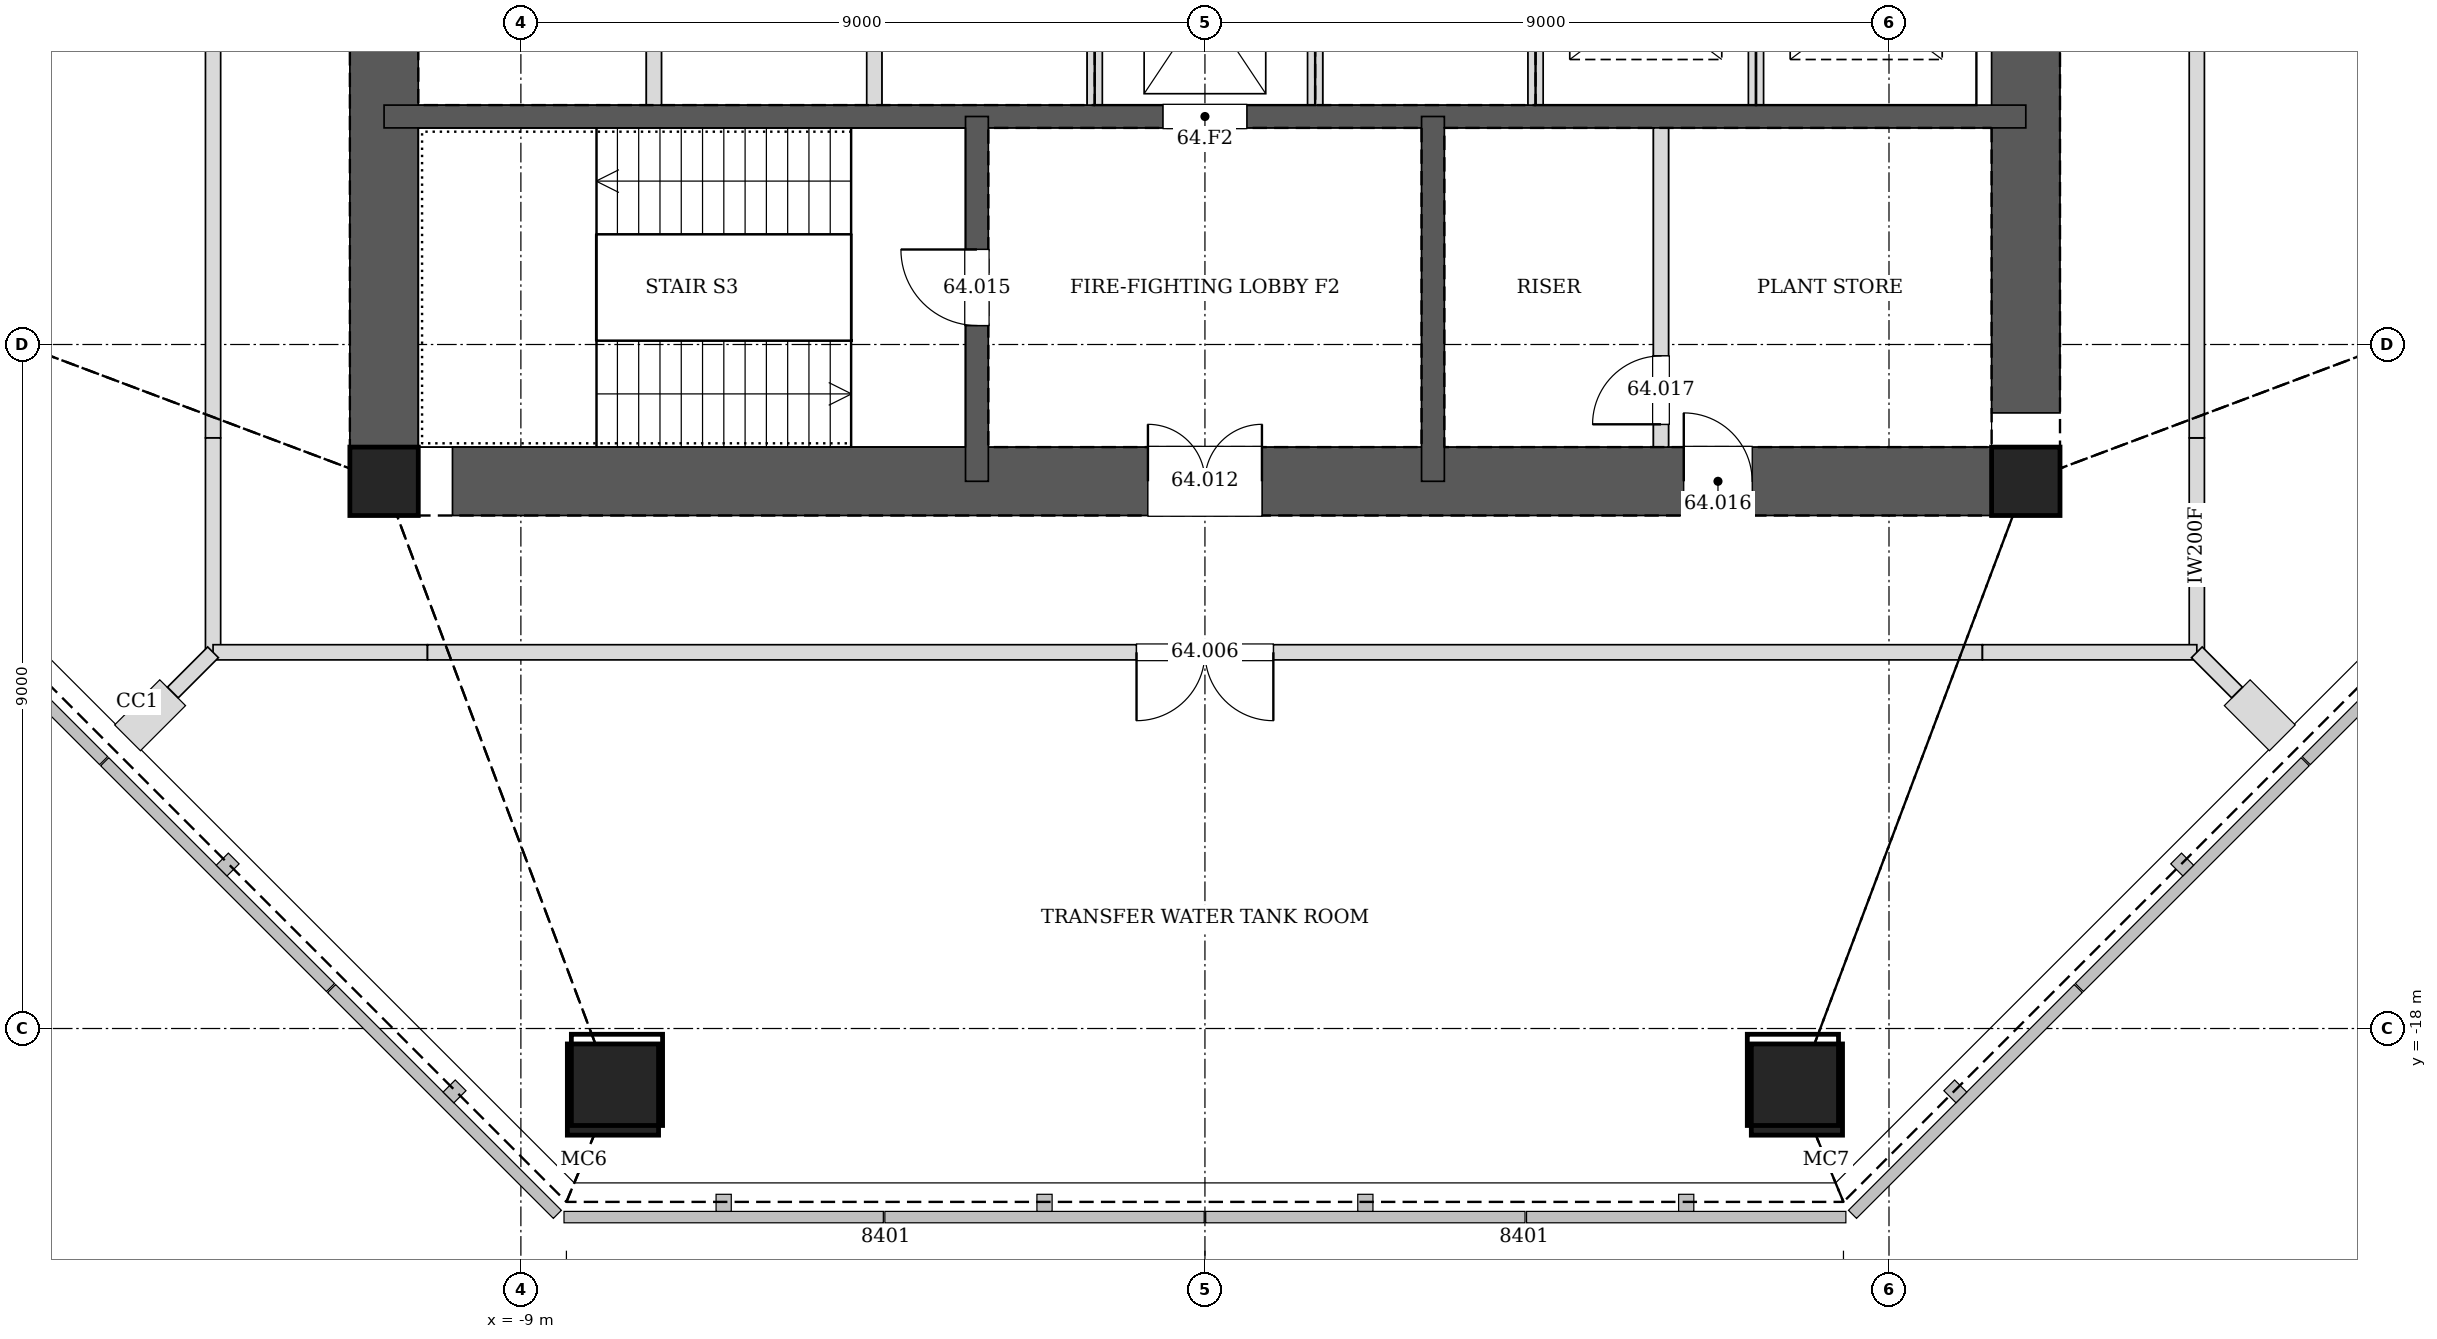
"""IFC4 building model, lengths in metres.
Left out: names, types, materials, properties, quantities, classifications, styles, units other than length and angle.
Written with IfcOpenShell. Run it as: python <this file> out.ifc"""

import sys

from ifc_helpers import new_model, si_unit, direction, frame, frame_2d, origin, origin_2d, place, context, subcontext, project, spatial, rectangle, hollow_rectangle, extrude, element, fill, save


model = new_model("IFC4")
c1 = context("Model", 3, precision=1e-05, world=origin(), true_north=direction((0.0, 1.0)))
c2 = subcontext(c1, "Body", "Model", "MODEL_VIEW")
j1 = project(units=[si_unit("LENGTHUNIT", "METRE"), si_unit("PLANEANGLEUNIT", "RADIAN")], contexts=[c1])
p1 = place(None, origin())
s1 = spatial("IfcSite", under=j1, at=p1, CompositionType="ELEMENT")
p2 = place(p1, origin())
s2 = spatial("IfcBuilding", under=s1, at=p2, CompositionType="ELEMENT")
p3 = place(p2, frame((0.0, 0.0, 266.3)))
s3 = spatial("IfcBuildingStorey", under=s2, at=p3, CompositionType="ELEMENT", Elevation=266.3)
for number, where, z_axis, x_axis in (
    (1, (-7.789, -18.803, 0.0), (0.012, 0.028, 1.0), (-0.924, 0.383, 0.0)),
    (2, (7.789, -18.803, 0.0), (-0.012, 0.028, 1.0), (-0.924, -0.383, 0.0)),
):
    element("IfcColumn", number, at=place(p3, frame(where, z_axis=z_axis, x_axis=x_axis)), inside=s3, PredefinedType="COLUMN", context=c2, shape_type="SweptSolid", body=[
        extrude(hollow_rectangle(XDim=1.2, YDim=1.2, WallThickness=0.055, at=origin_2d()), origin(), (0.0, 0.0, 1.0), 4.502),
    ])
for number, where, z_axis, x_axis in (
    (3, (-10.8, -10.8, 0.0), (0.0, 0.0, 1.0), (1.0, 0.0, 0.0)),
    (4, (10.8, -10.8, 0.0), (0.0, 0.0, 1.0), (1.0, 0.0, 0.0)),
):
    element("IfcColumn", number, at=place(p3, frame(where, z_axis=z_axis, x_axis=x_axis)), inside=s3, PredefinedType="COLUMN", context=c2, shape_type="SweptSolid", body=[
        extrude(hollow_rectangle(XDim=0.9, YDim=0.9, WallThickness=0.04, at=origin_2d()), origin(), (0.0, 0.0, 1.0), 4.5),
    ])
p4 = place(p3, frame((-10.8, -10.8, 0.0), z_axis=(0.0, 0.0, 1.0), x_axis=(1.0, 0.0, 0.0)))
e5 = element("IfcWall", 5, at=p4, inside=s3, PredefinedType="SOLIDWALL", context=c2, shape_type="SweptSolid", body=[
    extrude(rectangle(XDim=21.6, YDim=0.9, at=frame_2d((10.8, 0.0))), origin(), (0.0, 0.0, 1.0), 4.5),
])
p5 = place(p4, frame((10.05, 0.0, 0.0)))
e6 = element("IfcOpeningElement", 6, at=p5, cuts=e5, PredefinedType="OPENING", context=c2, shape_type="SweptSolid", body=[
    extrude(rectangle(XDim=1.5, YDim=2.1, at=frame_2d((0.75, 1.05))), frame((0.0, 0.46, 0.0), z_axis=(0.0, -1.0, 0.0), x_axis=(1.0, 0.0, 0.0)), (0.0, 0.0, 1.0), 0.92),
])
p6 = place(p4, frame((17.1, 0.0, 0.0)))
e7 = element("IfcOpeningElement", 7, at=p6, cuts=e5, PredefinedType="OPENING", context=c2, shape_type="SweptSolid", body=[
    extrude(rectangle(XDim=0.9, YDim=2.1, at=frame_2d((0.45, 1.05))), frame((0.0, 0.46, 0.0), z_axis=(0.0, -1.0, 0.0), x_axis=(1.0, 0.0, 0.0)), (0.0, 0.0, 1.0), 0.92),
])
p7 = place(p3, frame((10.8, -10.8, 0.0), z_axis=(0.0, 0.0, 1.0), x_axis=(0.0, 1.0, 0.0)))
e8 = element("IfcWall", 8, at=p7, inside=s3, PredefinedType="SOLIDWALL", context=c2, shape_type="SweptSolid", body=[
    extrude(rectangle(XDim=21.6, YDim=0.9, at=frame_2d((10.8, 0.0))), origin(), (0.0, 0.0, 1.0), 4.5),
])
p8 = place(p7, frame((11.7, 0.0, 0.0)))
e9 = element("IfcOpeningElement", 9, at=p8, cuts=e8, PredefinedType="OPENING", context=c2, shape_type="SweptSolid", body=[
    extrude(rectangle(XDim=1.2, YDim=2.1, at=frame_2d((0.6, 1.05))), frame((0.0, 0.46, 0.0), z_axis=(0.0, -1.0, 0.0), x_axis=(1.0, 0.0, 0.0)), (0.0, 0.0, 1.0), 0.92),
])
p9 = place(p7, frame((8.7, 0.0, 0.0)))
e10 = element("IfcOpeningElement", 10, at=p9, cuts=e8, PredefinedType="OPENING", context=c2, shape_type="SweptSolid", body=[
    extrude(rectangle(XDim=1.2, YDim=2.1, at=frame_2d((0.6, 1.05))), frame((0.0, 0.46, 0.0), z_axis=(0.0, -1.0, 0.0), x_axis=(1.0, 0.0, 0.0)), (0.0, 0.0, 1.0), 0.92),
])
p10 = place(p3, frame((-10.8, 10.8, 0.0), z_axis=(0.0, 0.0, 1.0), x_axis=(0.0, -1.0, 0.0)))
e11 = element("IfcWall", 11, at=p10, inside=s3, PredefinedType="SOLIDWALL", context=c2, shape_type="SweptSolid", body=[
    extrude(rectangle(XDim=21.6, YDim=0.9, at=frame_2d((10.8, 0.0))), origin(), (0.0, 0.0, 1.0), 4.5),
])
p11 = place(p10, frame((8.7, 0.0, 0.0)))
e12 = element("IfcOpeningElement", 12, at=p11, cuts=e11, PredefinedType="OPENING", context=c2, shape_type="SweptSolid", body=[
    extrude(rectangle(XDim=1.2, YDim=2.1, at=frame_2d((0.6, 1.05))), frame((0.0, 0.46, 0.0), z_axis=(0.0, -1.0, 0.0), x_axis=(1.0, 0.0, 0.0)), (0.0, 0.0, 1.0), 0.92),
])
p12 = place(p10, frame((11.7, 0.0, 0.0)))
e13 = element("IfcOpeningElement", 13, at=p12, cuts=e11, PredefinedType="OPENING", context=c2, shape_type="SweptSolid", body=[
    extrude(rectangle(XDim=1.2, YDim=2.1, at=frame_2d((0.6, 1.05))), frame((0.0, 0.46, 0.0), z_axis=(0.0, -1.0, 0.0), x_axis=(1.0, 0.0, 0.0)), (0.0, 0.0, 1.0), 0.92),
])
p13 = place(p3, frame((-10.8, -6.0, 0.0), z_axis=(0.0, 0.0, 1.0), x_axis=(1.0, 0.0, 0.0)))
e14 = element("IfcWall", 14, at=p13, inside=s3, PredefinedType="SOLIDWALL", context=c2, shape_type="SweptSolid", body=[
    extrude(rectangle(XDim=21.6, YDim=0.3, at=frame_2d((10.8, 0.0))), origin(), (0.0, 0.0, 1.0), 4.5),
])
p14 = place(p13, frame((10.25, 0.0, 0.0)))
e15 = element("IfcOpeningElement", 15, at=p14, cuts=e14, PredefinedType="OPENING", context=c2, shape_type="SweptSolid", body=[
    extrude(rectangle(XDim=1.1, YDim=2.1, at=frame_2d((0.55, 1.05))), frame((0.0, 0.16, 0.0), z_axis=(0.0, -1.0, 0.0), x_axis=(1.0, 0.0, 0.0)), (0.0, 0.0, 1.0), 0.32),
])
p15 = place(p3, frame((-3.0, -6.0, 0.0), z_axis=(0.0, 0.0, 1.0), x_axis=(0.0, -1.0, 0.0)))
e16 = element("IfcWall", 16, at=p15, inside=s3, PredefinedType="SOLIDWALL", context=c2, shape_type="SweptSolid", body=[
    extrude(rectangle(XDim=4.8, YDim=0.3, at=frame_2d((2.4, 0.0))), origin(), (0.0, 0.0, 1.0), 4.5),
])
p16 = place(p15, frame((1.75, 0.0, 0.0)))
e17 = element("IfcOpeningElement", 17, at=p16, cuts=e16, PredefinedType="OPENING", context=c2, shape_type="SweptSolid", body=[
    extrude(rectangle(XDim=1.0, YDim=2.1, at=frame_2d((0.5, 1.05))), frame((0.0, 0.16, 0.0), z_axis=(0.0, -1.0, 0.0), x_axis=(1.0, 0.0, 0.0)), (0.0, 0.0, 1.0), 0.32),
])
p17 = place(p3, frame((3.0, -6.0, 0.0), z_axis=(0.0, 0.0, 1.0), x_axis=(0.0, -1.0, 0.0)))
e18 = element("IfcWall", 18, at=p17, inside=s3, PredefinedType="SOLIDWALL", context=c2, shape_type="SweptSolid", body=[
    extrude(rectangle(XDim=4.8, YDim=0.3, at=frame_2d((2.4, 0.0))), origin(), (0.0, 0.0, 1.0), 4.5),
])
p18 = place(p3, frame((13.05, -13.05, 0.0), z_axis=(0.0, 0.0, 1.0), x_axis=(0.0, 1.0, 0.0)))
e19 = element("IfcWall", 19, at=p18, inside=s3, PredefinedType="PARTITIONING", context=c2, shape_type="SweptSolid", body=[
    extrude(rectangle(XDim=2.82, YDim=0.2, at=frame_2d((1.41, 0.0))), origin(), (0.0, 0.0, 1.0), 3.678),
])
p19 = place(p3, frame((13.05, -10.228, 0.0), z_axis=(0.0, 0.0, 1.0), x_axis=(0.0, 1.0, 0.0)))
e20 = element("IfcWall", 20, at=p19, inside=s3, PredefinedType="PARTITIONING", context=c2, shape_type="SweptSolid", body=[
    extrude(rectangle(XDim=12.829, YDim=0.2, at=frame_2d((6.415, 0.0))), origin(), (0.0, 0.0, 1.0), 3.363),
])
p20 = place(p19, frame((5.786, 0.0, 0.0)))
e21 = element("IfcOpeningElement", 21, at=p20, cuts=e20, PredefinedType="OPENING", context=c2, shape_type="SweptSolid", body=[
    extrude(rectangle(XDim=1.8, YDim=2.4, at=frame_2d((0.9, 1.2))), frame((0.0, 0.11, 0.0), z_axis=(0.0, -1.0, 0.0), x_axis=(1.0, 0.0, 0.0)), (0.0, 0.0, 1.0), 0.22),
])
p21 = place(p3, frame((-13.05, 10.228, 0.0), z_axis=(0.0, 0.0, 1.0), x_axis=(0.0, -1.0, 0.0)))
e22 = element("IfcWall", 22, at=p21, inside=s3, PredefinedType="PARTITIONING", context=c2, shape_type="SweptSolid", body=[
    extrude(rectangle(XDim=20.456, YDim=0.2, at=frame_2d((10.228, 0.0))), origin(), (0.0, 0.0, 1.0), 3.363),
])
p22 = place(p21, frame((9.328, 0.0, 0.0)))
e23 = element("IfcOpeningElement", 23, at=p22, cuts=e22, PredefinedType="OPENING", context=c2, shape_type="SweptSolid", body=[
    extrude(rectangle(XDim=1.8, YDim=2.4, at=frame_2d((0.9, 1.2))), frame((0.0, 0.11, 0.0), z_axis=(0.0, -1.0, 0.0), x_axis=(1.0, 0.0, 0.0)), (0.0, 0.0, 1.0), 0.22),
])
for number, where, z_axis, x_axis in (
    (24, (-13.05, -10.23, 0.0), (0.0, 0.0, 1.0), (0.0, -1.0, 0.0)),
    (25, (-13.05, -13.05, 0.0), (0.0, 0.0, 1.0), (1.0, 0.0, 0.0)),
):
    element("IfcWall", number, at=place(p3, frame(where, z_axis=z_axis, x_axis=x_axis)), inside=s3, PredefinedType="PARTITIONING", context=c2, shape_type="SweptSolid", body=[
        extrude(rectangle(XDim=2.82, YDim=0.2, at=frame_2d((1.41, 0.0))), origin(), (0.0, 0.0, 1.0), 3.678),
    ])
p23 = place(p3, frame((-10.228, -13.05, 0.0), z_axis=(0.0, 0.0, 1.0), x_axis=(1.0, 0.0, 0.0)))
e26 = element("IfcWall", 26, at=p23, inside=s3, PredefinedType="PARTITIONING", context=c2, shape_type="SweptSolid", body=[
    extrude(rectangle(XDim=20.456, YDim=0.2, at=frame_2d((10.228, 0.0))), origin(), (0.0, 0.0, 1.0), 3.363),
])
p24 = place(p23, frame((9.328, 0.0, 0.0)))
e27 = element("IfcOpeningElement", 27, at=p24, cuts=e26, PredefinedType="OPENING", context=c2, shape_type="SweptSolid", body=[
    extrude(rectangle(XDim=1.8, YDim=2.4, at=frame_2d((0.9, 1.2))), frame((0.0, 0.11, 0.0), z_axis=(0.0, -1.0, 0.0), x_axis=(1.0, 0.0, 0.0)), (0.0, 0.0, 1.0), 0.22),
])
p25 = place(p3, frame((10.23, -13.05, 0.0), z_axis=(0.0, 0.0, 1.0), x_axis=(1.0, 0.0, 0.0)))
e28 = element("IfcWall", 28, at=p25, inside=s3, PredefinedType="PARTITIONING", context=c2, shape_type="SweptSolid", body=[
    extrude(rectangle(XDim=2.82, YDim=0.2, at=frame_2d((1.41, 0.0))), origin(), (0.0, 0.0, 1.0), 3.678),
])
for number, where, z_axis, x_axis in (
    (29, (13.05, -13.05, 0.0), (0.0, 0.0, 1.0), (0.707, -0.707, 0.0)),
    (30, (-13.579, -13.579, 0.0), (0.0, 0.0, 1.0), (0.707, 0.707, 0.0)),
):
    element("IfcWall", number, at=place(p3, frame(where, z_axis=z_axis, x_axis=x_axis)), inside=s3, PredefinedType="PARTITIONING", context=c2, shape_type="SweptSolid", body=[
        extrude(rectangle(XDim=0.748, YDim=0.2, at=frame_2d((0.374, 0.0))), origin(), (0.0, 0.0, 1.0), 3.678),
    ])
for number, where, z_axis, x_axis in (
    (31, (-7.25, -5.85, 0.0), (0.0, 0.0, 1.0), (0.0, 1.0, 0.0)),
    (32, (-4.35, -5.85, 0.0), (0.0, 0.0, 1.0), (0.0, 1.0, 0.0)),
    (33, (-1.45, -5.85, 0.0), (0.0, 0.0, 1.0), (0.0, 1.0, 0.0)),
    (34, (1.45, -5.85, 0.0), (0.0, 0.0, 1.0), (0.0, 1.0, 0.0)),
    (35, (4.35, -5.85, 0.0), (0.0, 0.0, 1.0), (0.0, 1.0, 0.0)),
):
    element("IfcWall", number, at=place(p3, frame(where, z_axis=z_axis, x_axis=x_axis)), inside=s3, PredefinedType="PARTITIONING", context=c2, shape_type="SweptSolid", body=[
        extrude(rectangle(XDim=2.7, YDim=0.2, at=frame_2d((1.35, 0.0))), origin(), (0.0, 0.0, 1.0), 4.3),
    ])
p26 = place(p3, frame((7.25, -5.85, 0.0), z_axis=(0.0, 0.0, 1.0), x_axis=(0.0, 1.0, 0.0)))
e36 = element("IfcWall", 36, at=p26, inside=s3, PredefinedType="PARTITIONING", context=c2, shape_type="SweptSolid", body=[
    extrude(rectangle(XDim=2.7, YDim=0.2, at=frame_2d((1.35, 0.0))), origin(), (0.0, 0.0, 1.0), 4.5),
])
p27 = place(p3, frame((6.0, -10.35, 0.0), z_axis=(0.0, 0.0, 1.0), x_axis=(0.0, 1.0, 0.0)))
e37 = element("IfcWall", 37, at=p27, inside=s3, PredefinedType="PARTITIONING", context=c2, shape_type="SweptSolid", body=[
    extrude(rectangle(XDim=4.2, YDim=0.2, at=frame_2d((2.1, 0.0))), origin(), (0.0, 0.0, 1.0), 4.3),
])
p28 = place(p27, frame((0.3, 0.0, 0.0)))
e38 = element("IfcOpeningElement", 38, at=p28, cuts=e37, PredefinedType="OPENING", context=c2, shape_type="SweptSolid", body=[
    extrude(rectangle(XDim=0.9, YDim=2.1, at=frame_2d((0.45, 1.05))), frame((0.0, 0.11, 0.0), z_axis=(0.0, -1.0, 0.0), x_axis=(1.0, 0.0, 0.0)), (0.0, 0.0, 1.0), 0.22),
])
p29 = place(p24, frame((1.8, 0.0, 0.0), z_axis=(0.0, 0.0, 1.0), x_axis=(-1.0, 0.0, 0.0)))
e39 = element("IfcDoor", 39, at=p29, inside=s3, OperationType="DOUBLE_DOOR_SINGLE_SWING", PredefinedType="DOOR", context=c2, shape_type="SweptSolid", body=[
    extrude(rectangle(XDim=1.8, YDim=2.4, at=frame_2d((0.9, 1.2))), frame((0.0, 0.025, 0.0), z_axis=(0.0, -1.0, 0.0), x_axis=(1.0, 0.0, 0.0)), (0.0, 0.0, 1.0), 0.05),
])
fill(e27, e39)
p30 = place(p5, origin())
e40 = element("IfcDoor", 40, at=p30, inside=s3, OperationType="DOUBLE_DOOR_SINGLE_SWING", PredefinedType="DOOR", context=c2, shape_type="SweptSolid", body=[
    extrude(rectangle(XDim=1.5, YDim=2.1, at=frame_2d((0.75, 1.05))), frame((0.0, 0.025, 0.0), z_axis=(0.0, -1.0, 0.0), x_axis=(1.0, 0.0, 0.0)), (0.0, 0.0, 1.0), 0.05),
])
fill(e6, e40)
p31 = place(p16, frame((1.0, 0.0, 0.0), z_axis=(0.0, 0.0, 1.0), x_axis=(-1.0, 0.0, 0.0)))
e41 = element("IfcDoor", 41, at=p31, inside=s3, OperationType="SINGLE_SWING_RIGHT", PredefinedType="DOOR", context=c2, shape_type="SweptSolid", body=[
    extrude(rectangle(XDim=1.0, YDim=2.1, at=frame_2d((0.5, 1.05))), frame((0.0, 0.025, 0.0), z_axis=(0.0, -1.0, 0.0), x_axis=(1.0, 0.0, 0.0)), (0.0, 0.0, 1.0), 0.05),
])
fill(e17, e41)
p32 = place(p6, origin())
e42 = element("IfcDoor", 42, at=p32, inside=s3, OperationType="SINGLE_SWING_LEFT", PredefinedType="DOOR", context=c2, shape_type="SweptSolid", body=[
    extrude(rectangle(XDim=0.9, YDim=2.1, at=frame_2d((0.45, 1.05))), frame((0.0, 0.025, 0.0), z_axis=(0.0, -1.0, 0.0), x_axis=(1.0, 0.0, 0.0)), (0.0, 0.0, 1.0), 0.05),
])
fill(e7, e42)
p33 = place(p28, origin())
e43 = element("IfcDoor", 43, at=p33, inside=s3, OperationType="SINGLE_SWING_LEFT", PredefinedType="DOOR", context=c2, shape_type="SweptSolid", body=[
    extrude(rectangle(XDim=0.9, YDim=2.1, at=frame_2d((0.45, 1.05))), frame((0.0, 0.025, 0.0), z_axis=(0.0, -1.0, 0.0), x_axis=(1.0, 0.0, 0.0)), (0.0, 0.0, 1.0), 0.05),
])
fill(e38, e43)
p34 = place(p14, origin())
e44 = element("IfcDoor", 44, at=p34, inside=s3, OperationType="DOUBLE_DOOR_SLIDING", PredefinedType="DOOR", context=c2, shape_type="SweptSolid", body=[
    extrude(rectangle(XDim=1.1, YDim=2.1, at=frame_2d((0.55, 1.05))), frame((0.0, 0.025, 0.0), z_axis=(0.0, -1.0, 0.0), x_axis=(1.0, 0.0, 0.0)), (0.0, 0.0, 1.0), 0.05),
])
fill(e15, e44)
save(model, sys.argv[1])
